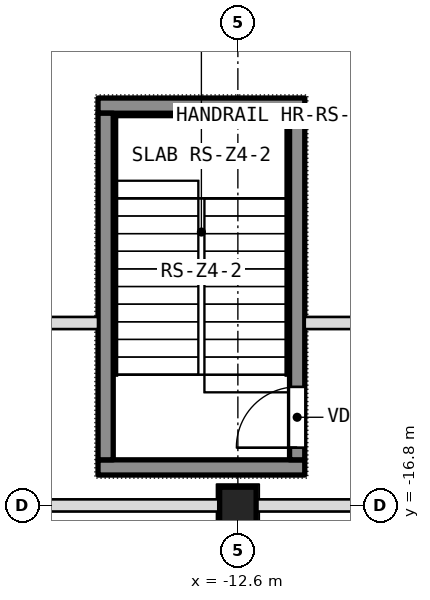
"""IFC4 building model, lengths in metres.
Left out: names, types, materials, properties, quantities, classifications, styles, units other than length and angle.
Written with IfcOpenShell. Run it as: python <this file> out.ifc"""

import sys

from ifc_helpers import new_model, si_unit, direction, frame, frame_2d, origin, origin_2d, place, context, subcontext, project, spatial, rectangle, extrude, element, fill, save


model = new_model("IFC4")
c1 = context("Model", 3, precision=1e-05, world=origin(), true_north=direction((0.0, 1.0)))
c2 = subcontext(c1, "Body", "Model", "MODEL_VIEW")
j1 = project(units=[si_unit("LENGTHUNIT", "METRE"), si_unit("PLANEANGLEUNIT", "RADIAN")], contexts=[c1])
p1 = place(None, origin())
s1 = spatial("IfcSite", under=j1, at=p1, CompositionType="ELEMENT")
p2 = place(p1, origin())
s2 = spatial("IfcBuilding", under=s1, at=p2, CompositionType="ELEMENT")
p3 = place(p2, frame((0.0, 0.0, 281.3)))
s3 = spatial("IfcBuildingStorey", under=s2, at=p3, CompositionType="ELEMENT", Elevation=281.3)
p4 = place(p3, frame((-12.6, -16.8, 0.0), z_axis=(0.0, 0.0, 1.0), x_axis=(1.0, 0.0, 0.0)))
e1 = element("IfcColumn", 1, at=p4, inside=s3, PredefinedType="COLUMN", context=c2, shape_type="SweptSolid", body=[
    extrude(rectangle(XDim=0.6, YDim=0.6, at=origin_2d()), origin(), (0.0, 0.0, 1.0), 7.2),
])
p5 = place(p3, frame((-21.0, -16.8, 0.0), z_axis=(0.0, 0.0, 1.0), x_axis=(1.0, 0.0, 0.0)))
e2 = element("IfcWall", 2, at=p5, inside=s3, PredefinedType="PARTITIONING", context=c2, shape_type="SweptSolid", body=[
    extrude(rectangle(XDim=42.0, YDim=0.2, at=frame_2d((21.0, 0.0))), origin(), (0.0, 0.0, 1.0), 6.6),
])
p6 = place(p5, frame((3.75, 0.0, 0.0)))
e3 = element("IfcOpeningElement", 3, at=p6, cuts=e2, PredefinedType="OPENING", context=c2, shape_type="SweptSolid", body=[
    extrude(rectangle(XDim=1.0, YDim=2.1, at=frame_2d((0.5, 1.05))), frame((0.0, 0.1, 0.0), z_axis=(0.0, -1.0, 0.0), x_axis=(1.0, 0.0, 0.0)), (0.0, 0.0, 1.0), 0.2),
])
p7 = place(p5, frame((11.7, 0.0, 0.0)))
e4 = element("IfcOpeningElement", 4, at=p7, cuts=e2, PredefinedType="OPENING", context=c2, shape_type="SweptSolid", body=[
    extrude(rectangle(XDim=1.8, YDim=2.1, at=frame_2d((0.9, 1.05))), frame((0.0, 0.1, 0.0), z_axis=(0.0, -1.0, 0.0), x_axis=(1.0, 0.0, 0.0)), (0.0, 0.0, 1.0), 0.2),
])
p8 = place(p5, frame((22.75, 0.0, 0.0)))
e5 = element("IfcOpeningElement", 5, at=p8, cuts=e2, PredefinedType="OPENING", context=c2, shape_type="SweptSolid", body=[
    extrude(rectangle(XDim=1.8, YDim=2.1, at=frame_2d((0.9, 1.05))), frame((0.0, 0.1, 0.0), z_axis=(0.0, -1.0, 0.0), x_axis=(1.0, 0.0, 0.0)), (0.0, 0.0, 1.0), 0.2),
])
p9 = place(p5, frame((37.25, 0.0, 0.0)))
e6 = element("IfcOpeningElement", 6, at=p9, cuts=e2, PredefinedType="OPENING", context=c2, shape_type="SweptSolid", body=[
    extrude(rectangle(XDim=1.0, YDim=2.1, at=frame_2d((0.5, 1.05))), frame((0.0, 0.1, 0.0), z_axis=(0.0, -1.0, 0.0), x_axis=(1.0, 0.0, 0.0)), (0.0, 0.0, 1.0), 0.2),
])
p10 = place(p3, frame((-19.7, -13.8, 0.0), z_axis=(0.0, 0.0, 1.0), x_axis=(1.0, 0.0, 0.0)))
e7 = element("IfcWall", 7, at=p10, inside=s3, PredefinedType="PARTITIONING", context=c2, shape_type="SweptSolid", body=[
    extrude(rectangle(XDim=4.8, YDim=0.2, at=frame_2d((2.4, 0.0))), origin(), (0.0, 0.0, 1.0), 6.94),
])
p11 = place(p3, frame((-11.5, -13.8, 0.0), z_axis=(0.0, 0.0, 1.0), x_axis=(1.0, 0.0, 0.0)))
e8 = element("IfcWall", 8, at=p11, inside=s3, PredefinedType="PARTITIONING", context=c2, shape_type="SweptSolid", body=[
    extrude(rectangle(XDim=28.4, YDim=0.2, at=frame_2d((14.2, 0.0))), origin(), (0.0, 0.0, 1.0), 6.94),
])
p12 = place(p11, frame((13.5, 0.0, 0.0)))
e9 = element("IfcOpeningElement", 9, at=p12, cuts=e8, PredefinedType="OPENING", context=c2, shape_type="SweptSolid", body=[
    extrude(rectangle(XDim=1.4, YDim=2.1, at=frame_2d((0.7, 1.05))), frame((0.0, 0.1, 0.0), z_axis=(0.0, -1.0, 0.0), x_axis=(1.0, 0.0, 0.0)), (0.0, 0.0, 1.0), 0.2),
])
p13 = place(p3, frame((-12.6, -32.529, 0.0), z_axis=(0.0, 0.0, 1.0), x_axis=(0.0, 1.0, 0.0)))
e10 = element("IfcWall", 10, at=p13, inside=s3, PredefinedType="PARTITIONING", context=c2, shape_type="SweptSolid", body=[
    extrude(rectangle(XDim=15.629, YDim=0.2, at=frame_2d((7.814, 0.0))), origin(), (0.0, 0.0, 1.0), 6.94),
])
for number, where, z_axis, x_axis in (
    (11, (-14.9, -16.175, 0.1), (0.0, 0.0, 1.0), (1.0, 0.0, 0.0)),
    (12, (-14.9, -10.225, 0.1), (0.0, 0.0, 1.0), (1.0, 0.0, 0.0)),
):
    element("IfcWall", number, at=place(p3, frame(where, z_axis=z_axis, x_axis=x_axis)), inside=s3, PredefinedType="SHEAR", context=c2, shape_type="SweptSolid", body=[
        extrude(rectangle(XDim=3.4, YDim=0.25, at=frame_2d((1.7, 0.0))), origin(), (0.0, 0.0, 1.0), 7.2),
    ])
p14 = place(p3, frame((-14.775, -16.05, 0.1), z_axis=(0.0, 0.0, 1.0), x_axis=(0.0, 1.0, 0.0)))
e13 = element("IfcWall", 13, at=p14, inside=s3, PredefinedType="SHEAR", context=c2, shape_type="SweptSolid", body=[
    extrude(rectangle(XDim=5.7, YDim=0.25, at=frame_2d((2.85, 0.0))), origin(), (0.0, 0.0, 1.0), 7.2),
])
p15 = place(p3, frame((-11.625, -16.05, 0.1), z_axis=(0.0, 0.0, 1.0), x_axis=(0.0, 1.0, 0.0)))
e14 = element("IfcWall", 14, at=p15, inside=s3, PredefinedType="SHEAR", context=c2, shape_type="SweptSolid", body=[
    extrude(rectangle(XDim=5.7, YDim=0.25, at=frame_2d((2.85, 0.0))), origin(), (0.0, 0.0, 1.0), 7.2),
])
p16 = place(p15, frame((0.2, 0.0, 0.0)))
e15 = element("IfcOpeningElement", 15, at=p16, cuts=e14, PredefinedType="OPENING", context=c2, shape_type="SweptSolid", body=[
    extrude(rectangle(XDim=1.0, YDim=2.1, at=frame_2d((0.5, 1.05))), frame((0.0, 0.125, 0.0), z_axis=(0.0, -1.0, 0.0), x_axis=(1.0, 0.0, 0.0)), (0.0, 0.0, 1.0), 0.25),
])
p17 = place(p16, origin())
e16 = element("IfcDoor", 16, at=p17, inside=s3, OperationType="SINGLE_SWING_LEFT", PredefinedType="DOOR", context=c2, shape_type="SweptSolid", body=[
    extrude(rectangle(XDim=1.0, YDim=2.1, at=frame_2d((0.5, 1.05))), frame((0.0, 0.025, 0.0), z_axis=(0.0, -1.0, 0.0), x_axis=(1.0, 0.0, 0.0)), (0.0, 0.0, 1.0), 0.05),
])
fill(e15, e16)
save(model, sys.argv[1])
